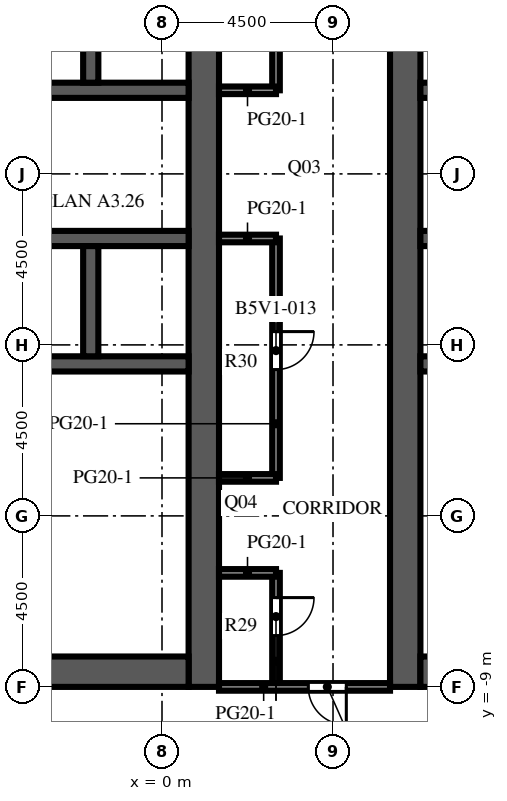
"""IFC4 building model, lengths in metres.
Left out: names, types, materials, properties, quantities, classifications, styles, units other than length and angle.
Written with IfcOpenShell. Run it as: python <this file> out.ifc"""

import sys

from ifc_helpers import new_model, si_unit, direction, frame, frame_2d, origin, place, context, subcontext, project, spatial, rectangle, extrude, element, fill, save


model = new_model("IFC4")
c1 = context("Model", 3, precision=1e-05, world=origin(), true_north=direction((0.0, 1.0)))
c2 = subcontext(c1, "Body", "Model", "MODEL_VIEW")
j1 = project(units=[si_unit("LENGTHUNIT", "METRE"), si_unit("PLANEANGLEUNIT", "RADIAN")], contexts=[c1])
p1 = place(None, origin())
s1 = spatial("IfcSite", under=j1, at=p1, CompositionType="ELEMENT")
p2 = place(p1, origin())
s2 = spatial("IfcBuilding", under=s1, at=p2, CompositionType="ELEMENT")
p3 = place(p2, frame((0.0, 0.0, 173.2)))
s3 = spatial("IfcBuildingStorey", under=s2, at=p3, CompositionType="ELEMENT", Elevation=173.2)
p4 = place(p3, frame((1.1, -9.0, 0.0), z_axis=(0.0, 0.0, 1.0), x_axis=(0.0, 1.0, 0.0)))
e1 = element("IfcWall", 1, at=p4, inside=s3, PredefinedType="SHEAR", context=c2, shape_type="SweptSolid", body=[
    extrude(rectangle(XDim=27.5, YDim=0.8, at=frame_2d((13.75, 0.0))), origin(), (0.0, 0.0, 1.0), 4.1),
])
p5 = place(p4, frame((12.55, 0.0, 0.0)))
e2 = element("IfcOpeningElement", 2, at=p5, cuts=e1, PredefinedType="OPENING", context=c2, shape_type="SweptSolid", body=[
    extrude(rectangle(XDim=2.4, YDim=2.4, at=frame_2d((1.2, 1.2))), frame((0.0, 0.41, 0.0), z_axis=(0.0, -1.0, 0.0), x_axis=(1.0, 0.0, 0.0)), (0.0, 0.0, 1.0), 0.82),
])
p6 = place(p4, frame((3.95, 0.0, 0.0)))
e3 = element("IfcOpeningElement", 3, at=p6, cuts=e1, PredefinedType="OPENING", context=c2, shape_type="SweptSolid", body=[
    extrude(rectangle(XDim=1.2, YDim=2.1, at=frame_2d((0.6, 1.05))), frame((0.0, 0.41, 0.0), z_axis=(0.0, -1.0, 0.0), x_axis=(1.0, 0.0, 0.0)), (0.0, 0.0, 1.0), 0.82),
])
p7 = place(p4, frame((22.35, 0.0, 0.0)))
e4 = element("IfcOpeningElement", 4, at=p7, cuts=e1, PredefinedType="OPENING", context=c2, shape_type="SweptSolid", body=[
    extrude(rectangle(XDim=1.2, YDim=2.1, at=frame_2d((0.6, 1.05))), frame((0.0, 0.41, 0.0), z_axis=(0.0, -1.0, 0.0), x_axis=(1.0, 0.0, 0.0)), (0.0, 0.0, 1.0), 0.82),
])
p8 = place(p3, frame((-9.7, -8.6, 0.0), z_axis=(0.0, 0.0, 1.0), x_axis=(1.0, 0.0, 0.0)))
e5 = element("IfcWall", 5, at=p8, inside=s3, PredefinedType="SHEAR", context=c2, shape_type="SweptSolid", body=[
    extrude(rectangle(XDim=10.4, YDim=0.8, at=frame_2d((5.2, 0.0))), origin(), (0.0, 0.0, 1.0), 4.1),
])
p9 = place(p3, frame((-9.7, -0.5, 0.0), z_axis=(0.0, 0.0, 1.0), x_axis=(1.0, 0.0, 0.0)))
e6 = element("IfcWall", 6, at=p9, inside=s3, PredefinedType="SHEAR", context=c2, shape_type="SweptSolid", body=[
    extrude(rectangle(XDim=10.4, YDim=0.4, at=frame_2d((5.2, 0.0))), origin(), (0.0, 0.0, 1.0), 4.1),
])
p10 = place(p3, frame((-9.7, 2.8, 0.0), z_axis=(0.0, 0.0, 1.0), x_axis=(1.0, 0.0, 0.0)))
e7 = element("IfcWall", 7, at=p10, inside=s3, PredefinedType="SHEAR", context=c2, shape_type="SweptSolid", body=[
    extrude(rectangle(XDim=10.4, YDim=0.4, at=frame_2d((5.2, 0.0))), origin(), (0.0, 0.0, 1.0), 4.1),
])
p11 = place(p10, frame((0.738, 0.0, 0.0)))
e8 = element("IfcOpeningElement", 8, at=p11, cuts=e7, PredefinedType="OPENING", context=c2, shape_type="SweptSolid", body=[
    extrude(rectangle(XDim=1.1, YDim=2.1, at=frame_2d((0.55, 1.05))), frame((0.0, 0.21, 0.0), z_axis=(0.0, -1.0, 0.0), x_axis=(1.0, 0.0, 0.0)), (0.0, 0.0, 1.0), 0.42),
])
p12 = place(p10, frame((3.337, 0.0, 0.0)))
e9 = element("IfcOpeningElement", 9, at=p12, cuts=e7, PredefinedType="OPENING", context=c2, shape_type="SweptSolid", body=[
    extrude(rectangle(XDim=1.1, YDim=2.1, at=frame_2d((0.55, 1.05))), frame((0.0, 0.21, 0.0), z_axis=(0.0, -1.0, 0.0), x_axis=(1.0, 0.0, 0.0)), (0.0, 0.0, 1.0), 0.42),
])
p13 = place(p10, frame((6.012, 0.0, 0.0)))
e10 = element("IfcOpeningElement", 10, at=p13, cuts=e7, PredefinedType="OPENING", context=c2, shape_type="SweptSolid", body=[
    extrude(rectangle(XDim=1.0, YDim=2.1, at=frame_2d((0.5, 1.05))), frame((0.0, 0.21, 0.0), z_axis=(0.0, -1.0, 0.0), x_axis=(1.0, 0.0, 0.0)), (0.0, 0.0, 1.0), 0.42),
])
p14 = place(p10, frame((8.613, 0.0, 0.0)))
e11 = element("IfcOpeningElement", 11, at=p14, cuts=e7, PredefinedType="OPENING", context=c2, shape_type="SweptSolid", body=[
    extrude(rectangle(XDim=1.0, YDim=2.1, at=frame_2d((0.5, 1.05))), frame((0.0, 0.21, 0.0), z_axis=(0.0, -1.0, 0.0), x_axis=(1.0, 0.0, 0.0)), (0.0, 0.0, 1.0), 0.42),
])
p15 = place(p3, frame((-9.7, 6.7, 0.0), z_axis=(0.0, 0.0, 1.0), x_axis=(1.0, 0.0, 0.0)))
e12 = element("IfcWall", 12, at=p15, inside=s3, PredefinedType="SHEAR", context=c2, shape_type="SweptSolid", body=[
    extrude(rectangle(XDim=10.4, YDim=0.4, at=frame_2d((5.2, 0.0))), origin(), (0.0, 0.0, 1.0), 4.1),
])
p16 = place(p15, frame((3.337, 0.0, 0.0)))
e13 = element("IfcOpeningElement", 13, at=p16, cuts=e12, PredefinedType="OPENING", context=c2, shape_type="SweptSolid", body=[
    extrude(rectangle(XDim=1.1, YDim=2.1, at=frame_2d((0.55, 1.05))), frame((0.0, 0.21, 0.0), z_axis=(0.0, -1.0, 0.0), x_axis=(1.0, 0.0, 0.0)), (0.0, 0.0, 1.0), 0.42),
])
p17 = place(p15, frame((5.962, 0.0, 0.0)))
e14 = element("IfcOpeningElement", 14, at=p17, cuts=e12, PredefinedType="OPENING", context=c2, shape_type="SweptSolid", body=[
    extrude(rectangle(XDim=1.1, YDim=2.1, at=frame_2d((0.55, 1.05))), frame((0.0, 0.21, 0.0), z_axis=(0.0, -1.0, 0.0), x_axis=(1.0, 0.0, 0.0)), (0.0, 0.0, 1.0), 0.42),
])
p18 = place(p15, frame((8.663, 0.0, 0.0)))
e15 = element("IfcOpeningElement", 15, at=p18, cuts=e12, PredefinedType="OPENING", context=c2, shape_type="SweptSolid", body=[
    extrude(rectangle(XDim=1.1, YDim=2.1, at=frame_2d((0.55, 1.05))), frame((0.0, 0.21, 0.0), z_axis=(0.0, -1.0, 0.0), x_axis=(1.0, 0.0, 0.0)), (0.0, 0.0, 1.0), 0.42),
])
p19 = place(p15, frame((0.688, 0.0, 0.0)))
e16 = element("IfcOpeningElement", 16, at=p19, cuts=e12, PredefinedType="OPENING", context=c2, shape_type="SweptSolid", body=[
    extrude(rectangle(XDim=1.0, YDim=2.1, at=frame_2d((0.5, 1.05))), frame((0.0, 0.21, 0.0), z_axis=(0.0, -1.0, 0.0), x_axis=(1.0, 0.0, 0.0)), (0.0, 0.0, 1.0), 0.42),
])
for number, where, z_axis, x_axis in (
    (17, (-1.875, -0.3, 0.0), (0.0, 0.0, 1.0), (0.0, 1.0, 0.0)),
    (18, (-1.875, 6.9, 0.0), (0.0, 0.0, 1.0), (0.0, 1.0, 0.0)),
):
    element("IfcWall", number, at=place(p3, frame(where, z_axis=z_axis, x_axis=x_axis)), inside=s3, PredefinedType="SHEAR", context=c2, shape_type="SweptSolid", body=[
        extrude(rectangle(XDim=2.9, YDim=0.4, at=frame_2d((1.45, 0.0))), origin(), (0.0, 0.0, 1.0), 4.1),
    ])
p20 = place(p3, frame((6.4, -9.0, 0.0), z_axis=(0.0, 0.0, 1.0), x_axis=(0.0, 1.0, 0.0)))
e19 = element("IfcWall", 19, at=p20, inside=s3, PredefinedType="SHEAR", context=c2, shape_type="SweptSolid", body=[
    extrude(rectangle(XDim=27.5, YDim=0.8, at=frame_2d((13.75, 0.0))), origin(), (0.0, 0.0, 1.0), 4.1),
])
p21 = place(p20, frame((12.55, 0.0, 0.0)))
e20 = element("IfcOpeningElement", 20, at=p21, cuts=e19, PredefinedType="OPENING", context=c2, shape_type="SweptSolid", body=[
    extrude(rectangle(XDim=2.4, YDim=2.4, at=frame_2d((1.2, 1.2))), frame((0.0, 0.41, 0.0), z_axis=(0.0, -1.0, 0.0), x_axis=(1.0, 0.0, 0.0)), (0.0, 0.0, 1.0), 0.82),
])
p22 = place(p20, frame((3.95, 0.0, 0.0)))
e21 = element("IfcOpeningElement", 21, at=p22, cuts=e19, PredefinedType="OPENING", context=c2, shape_type="SweptSolid", body=[
    extrude(rectangle(XDim=1.2, YDim=2.1, at=frame_2d((0.6, 1.05))), frame((0.0, 0.41, 0.0), z_axis=(0.0, -1.0, 0.0), x_axis=(1.0, 0.0, 0.0)), (0.0, 0.0, 1.0), 0.82),
])
p23 = place(p20, frame((22.35, 0.0, 0.0)))
e22 = element("IfcOpeningElement", 22, at=p23, cuts=e19, PredefinedType="OPENING", context=c2, shape_type="SweptSolid", body=[
    extrude(rectangle(XDim=1.2, YDim=2.1, at=frame_2d((0.6, 1.05))), frame((0.0, 0.41, 0.0), z_axis=(0.0, -1.0, 0.0), x_axis=(1.0, 0.0, 0.0)), (0.0, 0.0, 1.0), 0.82),
])
p24 = place(p3, frame((6.8, -8.6, 0.0), z_axis=(0.0, 0.0, 1.0), x_axis=(1.0, 0.0, 0.0)))
e23 = element("IfcWall", 23, at=p24, inside=s3, PredefinedType="SHEAR", context=c2, shape_type="SweptSolid", body=[
    extrude(rectangle(XDim=10.4, YDim=0.8, at=frame_2d((5.2, 0.0))), origin(), (0.0, 0.0, 1.0), 4.1),
])
p25 = place(p3, frame((6.8, -0.5, 0.0), z_axis=(0.0, 0.0, 1.0), x_axis=(1.0, 0.0, 0.0)))
e24 = element("IfcWall", 24, at=p25, inside=s3, PredefinedType="SHEAR", context=c2, shape_type="SweptSolid", body=[
    extrude(rectangle(XDim=10.4, YDim=0.4, at=frame_2d((5.2, 0.0))), origin(), (0.0, 0.0, 1.0), 4.1),
])
p26 = place(p3, frame((6.8, 2.8, 0.0), z_axis=(0.0, 0.0, 1.0), x_axis=(1.0, 0.0, 0.0)))
e25 = element("IfcWall", 25, at=p26, inside=s3, PredefinedType="SHEAR", context=c2, shape_type="SweptSolid", body=[
    extrude(rectangle(XDim=10.4, YDim=0.4, at=frame_2d((5.2, 0.0))), origin(), (0.0, 0.0, 1.0), 4.1),
])
p27 = place(p26, frame((0.738, 0.0, 0.0)))
e26 = element("IfcOpeningElement", 26, at=p27, cuts=e25, PredefinedType="OPENING", context=c2, shape_type="SweptSolid", body=[
    extrude(rectangle(XDim=1.1, YDim=2.1, at=frame_2d((0.55, 1.05))), frame((0.0, 0.21, 0.0), z_axis=(0.0, -1.0, 0.0), x_axis=(1.0, 0.0, 0.0)), (0.0, 0.0, 1.0), 0.42),
])
p28 = place(p26, frame((3.337, 0.0, 0.0)))
e27 = element("IfcOpeningElement", 27, at=p28, cuts=e25, PredefinedType="OPENING", context=c2, shape_type="SweptSolid", body=[
    extrude(rectangle(XDim=1.1, YDim=2.1, at=frame_2d((0.55, 1.05))), frame((0.0, 0.21, 0.0), z_axis=(0.0, -1.0, 0.0), x_axis=(1.0, 0.0, 0.0)), (0.0, 0.0, 1.0), 0.42),
])
p29 = place(p26, frame((6.012, 0.0, 0.0)))
e28 = element("IfcOpeningElement", 28, at=p29, cuts=e25, PredefinedType="OPENING", context=c2, shape_type="SweptSolid", body=[
    extrude(rectangle(XDim=1.0, YDim=2.1, at=frame_2d((0.5, 1.05))), frame((0.0, 0.21, 0.0), z_axis=(0.0, -1.0, 0.0), x_axis=(1.0, 0.0, 0.0)), (0.0, 0.0, 1.0), 0.42),
])
p30 = place(p26, frame((8.613, 0.0, 0.0)))
e29 = element("IfcOpeningElement", 29, at=p30, cuts=e25, PredefinedType="OPENING", context=c2, shape_type="SweptSolid", body=[
    extrude(rectangle(XDim=1.0, YDim=2.1, at=frame_2d((0.5, 1.05))), frame((0.0, 0.21, 0.0), z_axis=(0.0, -1.0, 0.0), x_axis=(1.0, 0.0, 0.0)), (0.0, 0.0, 1.0), 0.42),
])
p31 = place(p3, frame((6.8, 6.7, 0.0), z_axis=(0.0, 0.0, 1.0), x_axis=(1.0, 0.0, 0.0)))
e30 = element("IfcWall", 30, at=p31, inside=s3, PredefinedType="SHEAR", context=c2, shape_type="SweptSolid", body=[
    extrude(rectangle(XDim=10.4, YDim=0.4, at=frame_2d((5.2, 0.0))), origin(), (0.0, 0.0, 1.0), 4.1),
])
p32 = place(p31, frame((3.337, 0.0, 0.0)))
e31 = element("IfcOpeningElement", 31, at=p32, cuts=e30, PredefinedType="OPENING", context=c2, shape_type="SweptSolid", body=[
    extrude(rectangle(XDim=1.1, YDim=2.1, at=frame_2d((0.55, 1.05))), frame((0.0, 0.21, 0.0), z_axis=(0.0, -1.0, 0.0), x_axis=(1.0, 0.0, 0.0)), (0.0, 0.0, 1.0), 0.42),
])
p33 = place(p31, frame((5.962, 0.0, 0.0)))
e32 = element("IfcOpeningElement", 32, at=p33, cuts=e30, PredefinedType="OPENING", context=c2, shape_type="SweptSolid", body=[
    extrude(rectangle(XDim=1.1, YDim=2.1, at=frame_2d((0.55, 1.05))), frame((0.0, 0.21, 0.0), z_axis=(0.0, -1.0, 0.0), x_axis=(1.0, 0.0, 0.0)), (0.0, 0.0, 1.0), 0.42),
])
p34 = place(p31, frame((8.663, 0.0, 0.0)))
e33 = element("IfcOpeningElement", 33, at=p34, cuts=e30, PredefinedType="OPENING", context=c2, shape_type="SweptSolid", body=[
    extrude(rectangle(XDim=1.1, YDim=2.1, at=frame_2d((0.55, 1.05))), frame((0.0, 0.21, 0.0), z_axis=(0.0, -1.0, 0.0), x_axis=(1.0, 0.0, 0.0)), (0.0, 0.0, 1.0), 0.42),
])
p35 = place(p31, frame((0.688, 0.0, 0.0)))
e34 = element("IfcOpeningElement", 34, at=p35, cuts=e30, PredefinedType="OPENING", context=c2, shape_type="SweptSolid", body=[
    extrude(rectangle(XDim=1.0, YDim=2.1, at=frame_2d((0.5, 1.05))), frame((0.0, 0.21, 0.0), z_axis=(0.0, -1.0, 0.0), x_axis=(1.0, 0.0, 0.0)), (0.0, 0.0, 1.0), 0.42),
])
p36 = place(p3, frame((-0.8, -8.2, 0.0), z_axis=(0.0, 0.0, 1.0), x_axis=(0.0, 1.0, 0.0)))
e35 = element("IfcWall", 35, at=p36, inside=s3, PredefinedType="PARTITIONING", context=c2, shape_type="SweptSolid", body=[
    extrude(rectangle(XDim=2.55, YDim=0.1, at=frame_2d((1.275, 0.0))), origin(), (0.0, 0.0, 1.0), 3.65),
])
p37 = place(p36, frame((0.775, 0.0, 0.0)))
e36 = element("IfcOpeningElement", 36, at=p37, cuts=e35, PredefinedType="OPENING", context=c2, shape_type="SweptSolid", body=[
    extrude(rectangle(XDim=1.0, YDim=2.1, at=frame_2d((0.5, 1.05))), frame((0.0, 0.06, 0.0), z_axis=(0.0, -1.0, 0.0), x_axis=(1.0, 0.0, 0.0)), (0.0, 0.0, 1.0), 0.12),
])
p38 = place(p3, frame((-0.8, -5.65, 0.0), z_axis=(0.0, 0.0, 1.0), x_axis=(0.0, 1.0, 0.0)))
e37 = element("IfcWall", 37, at=p38, inside=s3, PredefinedType="PARTITIONING", context=c2, shape_type="SweptSolid", body=[
    extrude(rectangle(XDim=2.1, YDim=0.1, at=frame_2d((1.05, 0.0))), origin(), (0.0, 0.0, 1.0), 3.65),
])
p39 = place(p38, frame((0.55, 0.0, 0.0)))
e38 = element("IfcOpeningElement", 38, at=p39, cuts=e37, PredefinedType="OPENING", context=c2, shape_type="SweptSolid", body=[
    extrude(rectangle(XDim=1.0, YDim=2.1, at=frame_2d((0.5, 1.05))), frame((0.0, 0.06, 0.0), z_axis=(0.0, -1.0, 0.0), x_axis=(1.0, 0.0, 0.0)), (0.0, 0.0, 1.0), 0.12),
])
p40 = place(p3, frame((-0.8, -3.55, 0.0), z_axis=(0.0, 0.0, 1.0), x_axis=(0.0, 1.0, 0.0)))
e39 = element("IfcWall", 39, at=p40, inside=s3, PredefinedType="PARTITIONING", context=c2, shape_type="SweptSolid", body=[
    extrude(rectangle(XDim=2.85, YDim=0.1, at=frame_2d((1.425, 0.0))), origin(), (0.0, 0.0, 1.0), 3.65),
])
p41 = place(p40, frame((0.925, 0.0, 0.0)))
e40 = element("IfcOpeningElement", 40, at=p41, cuts=e39, PredefinedType="OPENING", context=c2, shape_type="SweptSolid", body=[
    extrude(rectangle(XDim=1.0, YDim=2.1, at=frame_2d((0.5, 1.05))), frame((0.0, 0.06, 0.0), z_axis=(0.0, -1.0, 0.0), x_axis=(1.0, 0.0, 0.0)), (0.0, 0.0, 1.0), 0.12),
])
for number, where, z_axis, x_axis in (
    (41, (-4.3, -5.65, 0.0), (0.0, 0.0, 1.0), (1.0, 0.0, 0.0)),
    (42, (-4.3, -3.55, 0.0), (0.0, 0.0, 1.0), (1.0, 0.0, 0.0)),
):
    element("IfcWall", number, at=place(p3, frame(where, z_axis=z_axis, x_axis=x_axis)), inside=s3, PredefinedType="PARTITIONING", context=c2, shape_type="SweptSolid", body=[
        extrude(rectangle(XDim=3.5, YDim=0.1, at=frame_2d((1.75, 0.0))), origin(), (0.0, 0.0, 1.0), 3.65),
    ])
p42 = place(p3, frame((3.0, -9.0, 0.0), z_axis=(0.0, 0.0, 1.0), x_axis=(0.0, 1.0, 0.0)))
e43 = element("IfcWall", 43, at=p42, inside=s3, PredefinedType="PARTITIONING", context=c2, shape_type="SweptSolid", body=[
    extrude(rectangle(XDim=3.0, YDim=0.2, at=frame_2d((1.5, 0.0))), origin(), (0.0, 0.0, 1.0), 3.65),
])
p43 = place(p42, frame((1.35, 0.0, 0.0)))
e44 = element("IfcOpeningElement", 44, at=p43, cuts=e43, PredefinedType="OPENING", context=c2, shape_type="SweptSolid", body=[
    extrude(rectangle(XDim=1.0, YDim=2.1, at=frame_2d((0.5, 1.05))), frame((0.0, 0.11, 0.0), z_axis=(0.0, -1.0, 0.0), x_axis=(1.0, 0.0, 0.0)), (0.0, 0.0, 1.0), 0.22),
])
p44 = place(p3, frame((3.0, -3.5, 0.0), z_axis=(0.0, 0.0, 1.0), x_axis=(0.0, 1.0, 0.0)))
e45 = element("IfcWall", 45, at=p44, inside=s3, PredefinedType="PARTITIONING", context=c2, shape_type="SweptSolid", body=[
    extrude(rectangle(XDim=6.3, YDim=0.2, at=frame_2d((3.15, 0.0))), origin(), (0.0, 0.0, 1.0), 3.65),
])
p45 = place(p44, frame((2.85, 0.0, 0.0)))
e46 = element("IfcOpeningElement", 46, at=p45, cuts=e45, PredefinedType="OPENING", context=c2, shape_type="SweptSolid", body=[
    extrude(rectangle(XDim=1.0, YDim=2.1, at=frame_2d((0.5, 1.05))), frame((0.0, 0.11, 0.0), z_axis=(0.0, -1.0, 0.0), x_axis=(1.0, 0.0, 0.0)), (0.0, 0.0, 1.0), 0.22),
])
p46 = place(p3, frame((3.0, 6.7, 0.0), z_axis=(0.0, 0.0, 1.0), x_axis=(0.0, 1.0, 0.0)))
e47 = element("IfcWall", 47, at=p46, inside=s3, PredefinedType="PARTITIONING", context=c2, shape_type="SweptSolid", body=[
    extrude(rectangle(XDim=11.8, YDim=0.2, at=frame_2d((5.9, 0.0))), origin(), (0.0, 0.0, 1.0), 3.65),
])
p47 = place(p46, frame((5.35, 0.0, 0.0)))
e48 = element("IfcOpeningElement", 48, at=p47, cuts=e47, PredefinedType="OPENING", context=c2, shape_type="SweptSolid", body=[
    extrude(rectangle(XDim=1.0, YDim=2.1, at=frame_2d((0.5, 1.05))), frame((0.0, 0.11, 0.0), z_axis=(0.0, -1.0, 0.0), x_axis=(1.0, 0.0, 0.0)), (0.0, 0.0, 1.0), 0.22),
])
p48 = place(p3, frame((6.0, -9.0, 0.0), z_axis=(0.0, 0.0, 1.0), x_axis=(-1.0, 0.0, 0.0)))
e49 = element("IfcWall", 49, at=p48, inside=s3, PredefinedType="PARTITIONING", context=c2, shape_type="SweptSolid", body=[
    extrude(rectangle(XDim=4.5, YDim=0.2, at=frame_2d((2.25, 0.0))), origin(), (0.0, 0.0, 1.0), 3.65),
])
p49 = place(p48, frame((1.15, 0.0, 0.0)))
e50 = element("IfcOpeningElement", 50, at=p49, cuts=e49, PredefinedType="OPENING", context=c2, shape_type="SweptSolid", body=[
    extrude(rectangle(XDim=1.0, YDim=2.1, at=frame_2d((0.5, 1.05))), frame((0.0, 0.11, 0.0), z_axis=(0.0, -1.0, 0.0), x_axis=(1.0, 0.0, 0.0)), (0.0, 0.0, 1.0), 0.22),
])
for number, where, z_axis, x_axis in (
    (51, (1.5, -6.0, 0.0), (0.0, 0.0, 1.0), (1.0, 0.0, 0.0)),
    (52, (1.5, -3.5, 0.0), (0.0, 0.0, 1.0), (1.0, 0.0, 0.0)),
    (53, (1.5, 2.8, 0.0), (0.0, 0.0, 1.0), (1.0, 0.0, 0.0)),
    (54, (1.5, 6.7, 0.0), (0.0, 0.0, 1.0), (1.0, 0.0, 0.0)),
):
    element("IfcWall", number, at=place(p3, frame(where, z_axis=z_axis, x_axis=x_axis)), inside=s3, PredefinedType="PARTITIONING", context=c2, shape_type="SweptSolid", body=[
        extrude(rectangle(XDim=1.5, YDim=0.2, at=frame_2d((0.75, 0.0))), origin(), (0.0, 0.0, 1.0), 3.65),
    ])
p50 = place(p17, origin())
e55 = element("IfcDoor", 55, at=p50, inside=s3, OperationType="DOUBLE_DOOR_SLIDING", PredefinedType="DOOR", context=c2, shape_type="SweptSolid", body=[
    extrude(rectangle(XDim=1.1, YDim=2.1, at=frame_2d((0.55, 1.05))), frame((0.0, 0.025, 0.0), z_axis=(0.0, -1.0, 0.0), x_axis=(1.0, 0.0, 0.0)), (0.0, 0.0, 1.0), 0.05),
])
fill(e14, e55)
p51 = place(p18, origin())
e56 = element("IfcDoor", 56, at=p51, inside=s3, OperationType="DOUBLE_DOOR_SLIDING", PredefinedType="DOOR", context=c2, shape_type="SweptSolid", body=[
    extrude(rectangle(XDim=1.1, YDim=2.1, at=frame_2d((0.55, 1.05))), frame((0.0, 0.025, 0.0), z_axis=(0.0, -1.0, 0.0), x_axis=(1.0, 0.0, 0.0)), (0.0, 0.0, 1.0), 0.05),
])
fill(e15, e56)
p52 = place(p5, origin())
e57 = element("IfcDoor", 57, at=p52, inside=s3, OperationType="DOUBLE_DOOR_DOUBLE_SWING", PredefinedType="DOOR", context=c2, shape_type="SweptSolid", body=[
    extrude(rectangle(XDim=2.4, YDim=2.4, at=frame_2d((1.2, 1.2))), frame((0.0, 0.025, 0.0), z_axis=(0.0, -1.0, 0.0), x_axis=(1.0, 0.0, 0.0)), (0.0, 0.0, 1.0), 0.05),
])
fill(e2, e57)
p53 = place(p21, origin())
e58 = element("IfcDoor", 58, at=p53, inside=s3, OperationType="DOUBLE_DOOR_DOUBLE_SWING", PredefinedType="DOOR", context=c2, shape_type="SweptSolid", body=[
    extrude(rectangle(XDim=2.4, YDim=2.4, at=frame_2d((1.2, 1.2))), frame((0.0, 0.025, 0.0), z_axis=(0.0, -1.0, 0.0), x_axis=(1.0, 0.0, 0.0)), (0.0, 0.0, 1.0), 0.05),
])
fill(e20, e58)
p54 = place(p13, origin())
e59 = element("IfcDoor", 59, at=p54, inside=s3, OperationType="SINGLE_SWING_LEFT", PredefinedType="DOOR", context=c2, shape_type="SweptSolid", body=[
    extrude(rectangle(XDim=1.0, YDim=2.1, at=frame_2d((0.5, 1.05))), frame((0.0, 0.025, 0.0), z_axis=(0.0, -1.0, 0.0), x_axis=(1.0, 0.0, 0.0)), (0.0, 0.0, 1.0), 0.05),
])
fill(e10, e59)
p55 = place(p14, origin())
e60 = element("IfcDoor", 60, at=p55, inside=s3, OperationType="SINGLE_SWING_RIGHT", PredefinedType="DOOR", context=c2, shape_type="SweptSolid", body=[
    extrude(rectangle(XDim=1.0, YDim=2.1, at=frame_2d((0.5, 1.05))), frame((0.0, 0.025, 0.0), z_axis=(0.0, -1.0, 0.0), x_axis=(1.0, 0.0, 0.0)), (0.0, 0.0, 1.0), 0.05),
])
fill(e11, e60)
p56 = place(p6, origin())
e61 = element("IfcDoor", 61, at=p56, inside=s3, OperationType="SINGLE_SWING_LEFT", PredefinedType="DOOR", context=c2, shape_type="SweptSolid", body=[
    extrude(rectangle(XDim=1.2, YDim=2.1, at=frame_2d((0.6, 1.05))), frame((0.0, 0.375, 0.0), z_axis=(0.0, -1.0, 0.0), x_axis=(1.0, 0.0, 0.0)), (0.0, 0.0, 1.0), 0.05),
])
fill(e3, e61)
p57 = place(p37, origin())
e62 = element("IfcDoor", 62, at=p57, inside=s3, OperationType="SINGLE_SWING_RIGHT", PredefinedType="DOOR", context=c2, shape_type="SweptSolid", body=[
    extrude(rectangle(XDim=1.0, YDim=2.1, at=frame_2d((0.5, 1.05))), frame((0.0, 0.025, 0.0), z_axis=(0.0, -1.0, 0.0), x_axis=(1.0, 0.0, 0.0)), (0.0, 0.0, 1.0), 0.05),
])
fill(e36, e62)
p58 = place(p39, origin())
e63 = element("IfcDoor", 63, at=p58, inside=s3, OperationType="SINGLE_SWING_LEFT", PredefinedType="DOOR", context=c2, shape_type="SweptSolid", body=[
    extrude(rectangle(XDim=1.0, YDim=2.1, at=frame_2d((0.5, 1.05))), frame((0.0, 0.025, 0.0), z_axis=(0.0, -1.0, 0.0), x_axis=(1.0, 0.0, 0.0)), (0.0, 0.0, 1.0), 0.05),
])
fill(e38, e63)
p59 = place(p41, origin())
e64 = element("IfcDoor", 64, at=p59, inside=s3, OperationType="SINGLE_SWING_RIGHT", PredefinedType="DOOR", context=c2, shape_type="SweptSolid", body=[
    extrude(rectangle(XDim=1.0, YDim=2.1, at=frame_2d((0.5, 1.05))), frame((0.0, 0.025, 0.0), z_axis=(0.0, -1.0, 0.0), x_axis=(1.0, 0.0, 0.0)), (0.0, 0.0, 1.0), 0.05),
])
fill(e40, e64)
p60 = place(p22, origin())
e65 = element("IfcDoor", 65, at=p60, inside=s3, OperationType="SINGLE_SWING_RIGHT", PredefinedType="DOOR", context=c2, shape_type="SweptSolid", body=[
    extrude(rectangle(XDim=1.2, YDim=2.1, at=frame_2d((0.6, 1.05))), frame((0.0, -0.325, 0.0), z_axis=(0.0, -1.0, 0.0), x_axis=(1.0, 0.0, 0.0)), (0.0, 0.0, 1.0), 0.05),
])
fill(e21, e65)
p61 = place(p49, origin())
e66 = element("IfcDoor", 66, at=p61, inside=s3, OperationType="SINGLE_SWING_LEFT", PredefinedType="DOOR", context=c2, shape_type="SweptSolid", body=[
    extrude(rectangle(XDim=1.0, YDim=2.1, at=frame_2d((0.5, 1.05))), frame((0.0, 0.025, 0.0), z_axis=(0.0, -1.0, 0.0), x_axis=(1.0, 0.0, 0.0)), (0.0, 0.0, 1.0), 0.05),
])
fill(e50, e66)
p62 = place(p43, origin())
e67 = element("IfcDoor", 67, at=p62, inside=s3, OperationType="SINGLE_SWING_RIGHT", PredefinedType="DOOR", context=c2, shape_type="SweptSolid", body=[
    extrude(rectangle(XDim=1.0, YDim=2.1, at=frame_2d((0.5, 1.05))), frame((0.0, 0.025, 0.0), z_axis=(0.0, -1.0, 0.0), x_axis=(1.0, 0.0, 0.0)), (0.0, 0.0, 1.0), 0.05),
])
fill(e44, e67)
p63 = place(p45, origin())
e68 = element("IfcDoor", 68, at=p63, inside=s3, OperationType="SINGLE_SWING_RIGHT", PredefinedType="DOOR", context=c2, shape_type="SweptSolid", body=[
    extrude(rectangle(XDim=1.0, YDim=2.1, at=frame_2d((0.5, 1.05))), frame((0.0, 0.025, 0.0), z_axis=(0.0, -1.0, 0.0), x_axis=(1.0, 0.0, 0.0)), (0.0, 0.0, 1.0), 0.05),
])
fill(e46, e68)
save(model, sys.argv[1])
